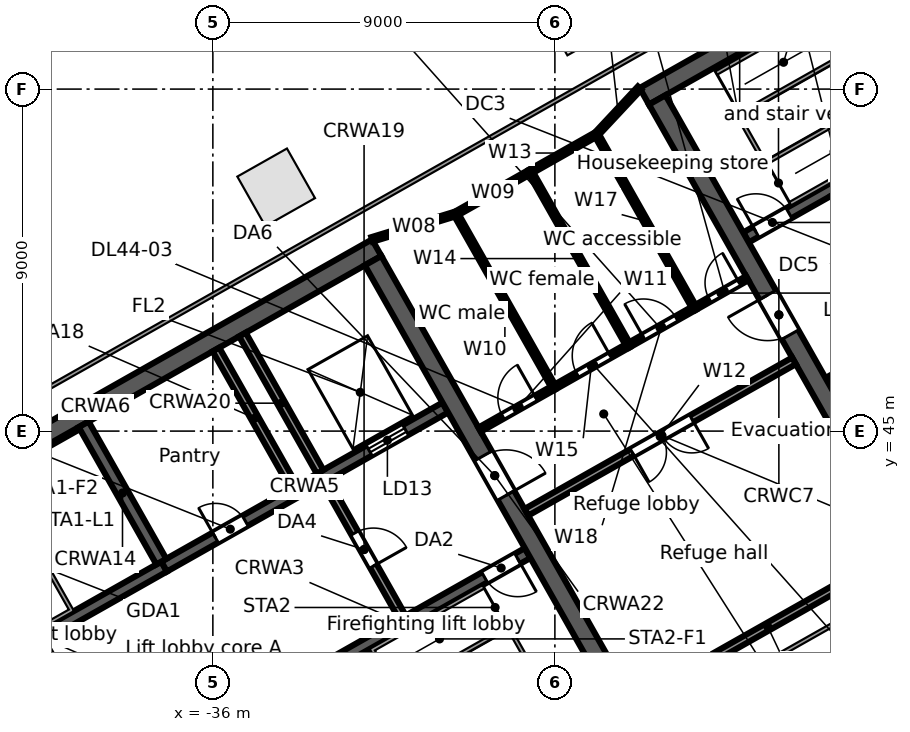
"""IFC4 building model, lengths in metres.
Left out: names, types, materials, properties, quantities, classifications, styles, units other than length and angle.
Written with IfcOpenShell. Run it as: python <this file> out.ifc"""

import sys

from ifc_helpers import new_model, si_unit, direction, frame, frame_2d, origin, origin_2d, place, context, subcontext, project, spatial, rectangle, extrude, element, fill, save


model = new_model("IFC4")
c1 = context("Model", 3, precision=1e-05, world=origin(), true_north=direction((0.0, 1.0)))
c2 = subcontext(c1, "Body", "Model", "MODEL_VIEW")
j1 = project(units=[si_unit("LENGTHUNIT", "METRE"), si_unit("PLANEANGLEUNIT", "RADIAN")], contexts=[c1])
p1 = place(None, origin())
s1 = spatial("IfcSite", under=j1, at=p1, CompositionType="ELEMENT")
p2 = place(p1, origin())
s2 = spatial("IfcBuilding", under=s1, at=p2, CompositionType="ELEMENT")
p3 = place(p2, frame((0.0, 0.0, 202.9)))
s3 = spatial("IfcBuildingStorey", under=s2, at=p3, CompositionType="ELEMENT", Elevation=202.9)
for number, where, z_axis, x_axis in (
    (1, (-26.388, 55.91, 0.0), (0.0, 0.0, 1.0), (-0.87, -0.492, 0.0)),
    (2, (-34.334, 51.414, 0.0), (0.0, 0.0, 1.0), (-0.87, -0.492, 0.0)),
):
    element("IfcColumn", number, at=place(p3, frame(where, z_axis=z_axis, x_axis=x_axis)), inside=s3, PredefinedType="COLUMN", context=c2, shape_type="SweptSolid", body=[
        extrude(rectangle(XDim=1.5, YDim=1.5, at=origin_2d()), origin(), (0.0, 0.0, 1.0), 4.6),
    ])
p4 = place(p3, frame((-34.245, 38.097, 0.0), z_axis=(0.0, 0.0, 1.0), x_axis=(0.870364520461, 0.492407962489, 0.0)))
e3 = element("IfcWall", 3, at=p4, inside=s3, PredefinedType="SOLIDWALL", context=c2, shape_type="SweptSolid", body=[
    extrude(rectangle(XDim=7.5, YDim=0.3, at=frame_2d((3.75, 0.0))), origin(), (0.0, 0.0, 1.0), 4.32),
])
p5 = place(p4, frame((6.2, 0.0, 0.0)))
e4 = element("IfcOpeningElement", 4, at=p5, cuts=e3, PredefinedType="OPENING", context=c2, shape_type="SweptSolid", body=[
    extrude(rectangle(XDim=1.0, YDim=2.1, at=frame_2d((0.5, 1.05))), frame((0.0, 0.16, 0.0), z_axis=(0.0, -1.0, 0.0), x_axis=(1.0, 0.0, 0.0)), (0.0, 0.0, 1.0), 0.32),
])
p6 = place(p3, frame((-43.81, 37.741, 0.0), z_axis=(0.0, 0.0, 1.0), x_axis=(0.870350569555, 0.492432620848, 0.0)))
e5 = element("IfcWall", 5, at=p6, inside=s3, PredefinedType="SOLIDWALL", context=c2, shape_type="SweptSolid", body=[
    extrude(rectangle(XDim=7.5, YDim=0.3, at=frame_2d((3.75, 0.0))), origin(), (0.0, 0.0, 1.0), 4.32),
])
p7 = place(p6, frame((0.3, 0.0, 0.0)))
e6 = element("IfcOpeningElement", 6, at=p7, cuts=e5, PredefinedType="OPENING", context=c2, shape_type="SweptSolid", body=[
    extrude(rectangle(XDim=1.0, YDim=2.1, at=frame_2d((0.5, 1.05))), frame((0.0, 0.16, 0.0), z_axis=(0.0, -1.0, 0.0), x_axis=(1.0, 0.0, 0.0)), (0.0, 0.0, 1.0), 0.32),
])
p8 = place(p3, frame((-37.282, 41.435, 0.0), z_axis=(0.0, 0.0, 1.0), x_axis=(0.870356271124, 0.492422543467, 0.0)))
e7 = element("IfcWall", 7, at=p8, inside=s3, PredefinedType="SOLIDWALL", context=c2, shape_type="SweptSolid", body=[
    extrude(rectangle(XDim=8.5, YDim=0.3, at=frame_2d((4.25, 0.0))), origin(), (0.0, 0.0, 1.0), 4.32),
])
p9 = place(p8, frame((6.2, 0.0, 0.0)))
e8 = element("IfcOpeningElement", 8, at=p9, cuts=e7, PredefinedType="OPENING", context=c2, shape_type="SweptSolid", body=[
    extrude(rectangle(XDim=1.1, YDim=2.1, at=frame_2d((0.55, 1.05))), frame((0.0, 0.16, 0.0), z_axis=(0.0, -1.0, 0.0), x_axis=(1.0, 0.0, 0.0)), (0.0, 0.0, 1.0), 0.32),
])
p10 = place(p8, frame((1.55, 0.0, 0.0)))
e9 = element("IfcOpeningElement", 9, at=p10, cuts=e7, PredefinedType="OPENING", context=c2, shape_type="SweptSolid", body=[
    extrude(rectangle(XDim=0.9, YDim=2.1, at=frame_2d((0.45, 1.05))), frame((0.0, 0.16, 0.0), z_axis=(0.0, -1.0, 0.0), x_axis=(1.0, 0.0, 0.0)), (0.0, 0.0, 1.0), 0.32),
])
p11 = place(p3, frame((-46.486, 41.455, 0.0), z_axis=(0.0, 0.0, 1.0), x_axis=(0.870353598469, 0.492427267353, 0.0)))
e10 = element("IfcWall", 10, at=p11, inside=s3, PredefinedType="SOLIDWALL", context=c2, shape_type="SweptSolid", body=[
    extrude(rectangle(XDim=17.0, YDim=0.5, at=frame_2d((8.5, 0.0))), origin(), (0.0, 0.0, 1.0), 4.32),
])
p12 = place(p3, frame((-46.145, 41.361, 0.0), z_axis=(0.0, 0.0, 1.0), x_axis=(0.492435316254, -0.870349044525, 0.0)))
e11 = element("IfcWall", 11, at=p12, inside=s3, PredefinedType="SOLIDWALL", context=c2, shape_type="SweptSolid", body=[
    extrude(rectangle(XDim=13.0, YDim=0.5, at=frame_2d((6.5, 0.0))), origin(), (0.0, 0.0, 1.0), 4.32),
])
p13 = place(p12, frame((5.9, 0.0, 0.0)))
e12 = element("IfcOpeningElement", 12, at=p13, cuts=e11, PredefinedType="OPENING", context=c2, shape_type="SweptSolid", body=[
    extrude(rectangle(XDim=1.2, YDim=2.1, at=frame_2d((0.6, 1.05))), frame((0.0, 0.26, 0.0), z_axis=(0.0, -1.0, 0.0), x_axis=(1.0, 0.0, 0.0)), (0.0, 0.0, 1.0), 0.52),
])
p14 = place(p3, frame((-40.516, 39.433, 0.0), z_axis=(0.0, 0.0, 1.0), x_axis=(0.492453559952, -0.87033872216, 0.0)))
e13 = element("IfcWall", 13, at=p14, inside=s3, PredefinedType="PARTITIONING", context=c2, shape_type="SweptSolid", body=[
    extrude(rectangle(XDim=4.1, YDim=0.2, at=frame_2d((2.05, 0.0))), origin(), (0.0, 0.0, 1.0), 4.32),
])
p15 = place(p14, frame((1.55, 0.0, 0.0)))
e14 = element("IfcOpeningElement", 14, at=p15, cuts=e13, PredefinedType="OPENING", context=c2, shape_type="SweptSolid", body=[
    extrude(rectangle(XDim=1.0, YDim=2.1, at=frame_2d((0.5, 1.05))), frame((0.0, 0.11, 0.0), z_axis=(0.0, -1.0, 0.0), x_axis=(1.0, 0.0, 0.0)), (0.0, 0.0, 1.0), 0.22),
])
p16 = place(p3, frame((-39.399, 45.177, 0.0), z_axis=(0.0, 0.0, 1.0), x_axis=(0.492396453737, -0.870371031427, 0.0)))
e15 = element("IfcWall", 15, at=p16, inside=s3, PredefinedType="SOLIDWALL", context=c2, shape_type="SweptSolid", body=[
    extrude(rectangle(XDim=4.15, YDim=0.3, at=frame_2d((2.075, 0.0))), origin(), (0.0, 0.0, 1.0), 4.32),
])
p17 = place(p3, frame((-35.918, 47.147, 0.0), z_axis=(0.0, 0.0, 1.0), x_axis=(0.492441017253, -0.870345818929, 0.0)))
e16 = element("IfcWall", 16, at=p17, inside=s3, PredefinedType="SOLIDWALL", context=c2, shape_type="SweptSolid", body=[
    extrude(rectangle(XDim=4.15, YDim=0.2, at=frame_2d((2.075, 0.0))), origin(), (0.0, 0.0, 1.0), 4.32),
])
p18 = place(p3, frame((-33.031, 43.667, 0.0), z_axis=(0.0, 0.0, 1.0), x_axis=(0.492408451753, -0.87036424366, 0.0)))
e17 = element("IfcWall", 17, at=p18, inside=s3, PredefinedType="PARTITIONING", context=c2, shape_type="SweptSolid", body=[
    extrude(rectangle(XDim=4.1, YDim=0.2, at=frame_2d((2.05, 0.0))), origin(), (0.0, 0.0, 1.0), 4.32),
])
p19 = place(p18, frame((1.55, 0.0, 0.0)))
e18 = element("IfcOpeningElement", 18, at=p19, cuts=e17, PredefinedType="OPENING", context=c2, shape_type="SweptSolid", body=[
    extrude(rectangle(XDim=1.0, YDim=2.1, at=frame_2d((0.5, 1.05))), frame((0.0, 0.11, 0.0), z_axis=(0.0, -1.0, 0.0), x_axis=(1.0, 0.0, 0.0)), (0.0, 0.0, 1.0), 0.22),
])
p20 = place(p3, frame((-35.222, 47.541, 0.0), z_axis=(0.0, 0.0, 1.0), x_axis=(0.492421666909, -0.870356767055, 0.0)))
e19 = element("IfcWall", 19, at=p20, inside=s3, PredefinedType="SOLIDWALL", context=c2, shape_type="SweptSolid", body=[
    extrude(rectangle(XDim=4.15, YDim=0.2, at=frame_2d((2.075, 0.0))), origin(), (0.0, 0.0, 1.0), 4.32),
])
p21 = place(p3, frame((-31.784, 49.486, 0.0), z_axis=(0.0, 0.0, 1.0), x_axis=(0.492435316254, -0.870349044525, 0.0)))
e20 = element("IfcWall", 20, at=p21, inside=s3, PredefinedType="SOLIDWALL", context=c2, shape_type="SweptSolid", body=[
    extrude(rectangle(XDim=13.0, YDim=0.5, at=frame_2d((6.5, 0.0))), origin(), (0.0, 0.0, 1.0), 4.32),
])
p22 = place(p21, frame((5.9, 0.0, 0.0)))
e21 = element("IfcOpeningElement", 21, at=p22, cuts=e20, PredefinedType="OPENING", context=c2, shape_type="SweptSolid", body=[
    extrude(rectangle(XDim=1.2, YDim=2.1, at=frame_2d((0.6, 1.05))), frame((0.0, 0.26, 0.0), z_axis=(0.0, -1.0, 0.0), x_axis=(1.0, 0.0, 0.0)), (0.0, 0.0, 1.0), 0.52),
])
p23 = place(p3, frame((-19.805, 46.267, 0.0), z_axis=(0.0, 0.0, 1.0), x_axis=(0.870353598469, 0.492427267353, 0.0)))
e22 = element("IfcWall", 22, at=p23, inside=s3, PredefinedType="SOLIDWALL", context=c2, shape_type="SweptSolid", body=[
    extrude(rectangle(XDim=5.0, YDim=0.3, at=frame_2d((2.5, 0.0))), origin(), (0.0, 0.0, 1.0), 4.32),
])
p24 = place(p23, frame((0.65, 0.0, 0.0)))
e23 = element("IfcOpeningElement", 23, at=p24, cuts=e22, PredefinedType="OPENING", context=c2, shape_type="SweptSolid", body=[
    extrude(rectangle(XDim=1.1, YDim=2.1, at=frame_2d((0.55, 1.05))), frame((0.0, 0.16, 0.0), z_axis=(0.0, -1.0, 0.0), x_axis=(1.0, 0.0, 0.0)), (0.0, 0.0, 1.0), 0.32),
])
p25 = place(p23, frame((3.75, 0.0, 0.0)))
e24 = element("IfcOpeningElement", 24, at=p25, cuts=e22, PredefinedType="OPENING", context=c2, shape_type="SweptSolid", body=[
    extrude(rectangle(XDim=0.9, YDim=2.1, at=frame_2d((0.45, 1.05))), frame((0.0, 0.16, 0.0), z_axis=(0.0, -1.0, 0.0), x_axis=(1.0, 0.0, 0.0)), (0.0, 0.0, 1.0), 0.32),
])
p26 = place(p3, frame((-21.972, 50.097, 0.0), z_axis=(0.0, 0.0, 1.0), x_axis=(0.870350976978, 0.492431900747, 0.0)))
e25 = element("IfcWall", 25, at=p26, inside=s3, PredefinedType="SOLIDWALL", context=c2, shape_type="SweptSolid", body=[
    extrude(rectangle(XDim=7.3, YDim=0.3, at=frame_2d((3.65, 0.0))), origin(), (0.0, 0.0, 1.0), 4.32),
])
p27 = place(p26, frame((0.3, 0.0, 0.0)))
e26 = element("IfcOpeningElement", 26, at=p27, cuts=e25, PredefinedType="OPENING", context=c2, shape_type="SweptSolid", body=[
    extrude(rectangle(XDim=1.0, YDim=2.1, at=frame_2d((0.5, 1.05))), frame((0.0, 0.16, 0.0), z_axis=(0.0, -1.0, 0.0), x_axis=(1.0, 0.0, 0.0)), (0.0, 0.0, 1.0), 0.32),
])
p28 = place(p3, frame((-24.647, 53.811, 0.0), z_axis=(0.0, 0.0, 1.0), x_axis=(0.87034965173, 0.492434243055, 0.0)))
e27 = element("IfcWall", 27, at=p28, inside=s3, PredefinedType="SOLIDWALL", context=c2, shape_type="SweptSolid", body=[
    extrude(rectangle(XDim=15.0, YDim=0.5, at=frame_2d((7.5, 0.0))), origin(), (0.0, 0.0, 1.0), 4.32),
])
p29 = place(p3, frame((-24.307, 53.716, 0.0), z_axis=(0.0, 0.0, 1.0), x_axis=(0.492427267353, -0.870353598469, 0.0)))
e28 = element("IfcWall", 28, at=p29, inside=s3, PredefinedType="SOLIDWALL", context=c2, shape_type="SweptSolid", body=[
    extrude(rectangle(XDim=13.0, YDim=0.5, at=frame_2d((6.5, 0.0))), origin(), (0.0, 0.0, 1.0), 4.32),
])
p30 = place(p29, frame((5.9, 0.0, 0.0)))
e29 = element("IfcOpeningElement", 29, at=p30, cuts=e28, PredefinedType="OPENING", context=c2, shape_type="SweptSolid", body=[
    extrude(rectangle(XDim=1.2, YDim=2.1, at=frame_2d((0.6, 1.05))), frame((0.0, 0.26, 0.0), z_axis=(0.0, -1.0, 0.0), x_axis=(1.0, 0.0, 0.0)), (0.0, 0.0, 1.0), 0.52),
])
p31 = place(p3, frame((-31.812, 50.044, 0.0), z_axis=(0.0, 0.0, 1.0), x_axis=(0.956397612161, 0.292067813107, 0.0)))
e30 = element("IfcWall", 30, at=p31, inside=s3, PredefinedType="PARTITIONING", context=c2, shape_type="SweptSolid", body=[
    extrude(rectangle(XDim=2.305, YDim=0.125, at=frame_2d((1.152, 0.0))), origin(), (0.0, 0.0, 1.0), 4.32),
])
p32 = place(p3, frame((-29.608, 50.717, 0.0), z_axis=(0.0, 0.0, 1.0), x_axis=(0.870332332106, 0.492464853254, 0.0)))
e31 = element("IfcWall", 31, at=p32, inside=s3, PredefinedType="PARTITIONING", context=c2, shape_type="SweptSolid", body=[
    extrude(rectangle(XDim=2.25, YDim=0.125, at=frame_2d((1.125, 0.0))), origin(), (0.0, 0.0, 1.0), 4.32),
])
p33 = place(p3, frame((-29.608, 50.717, 0.0), z_axis=(0.0, 0.0, 1.0), x_axis=(0.492328430905, -0.870409510588, 0.0)))
e32 = element("IfcWall", 32, at=p33, inside=s3, PredefinedType="PARTITIONING", context=c2, shape_type="SweptSolid", body=[
    extrude(rectangle(XDim=5.25, YDim=0.125, at=frame_2d((2.625, 0.0))), origin(), (0.0, 0.0, 1.0), 4.32),
])
p34 = place(p3, frame((-28.981, 45.039, 0.0), z_axis=(0.0, 0.0, 1.0), x_axis=(0.870332332106, 0.492464853254, 0.0)))
e33 = element("IfcWall", 33, at=p34, inside=s3, PredefinedType="PARTITIONING", context=c2, shape_type="SweptSolid", body=[
    extrude(rectangle(XDim=2.25, YDim=0.125, at=frame_2d((1.125, 0.0))), origin(), (0.0, 0.0, 1.0), 4.32),
])
p35 = place(p34, frame((0.7, 0.0, 0.0)))
e34 = element("IfcOpeningElement", 34, at=p35, cuts=e33, PredefinedType="OPENING", context=c2, shape_type="SweptSolid", body=[
    extrude(rectangle(XDim=1.0, YDim=2.1, at=frame_2d((0.5, 1.05))), frame((0.0, 0.073, 0.0), z_axis=(0.0, -1.0, 0.0), x_axis=(1.0, 0.0, 0.0)), (0.0, 0.0, 1.0), 0.145),
])
p36 = place(p3, frame((-27.75, 42.864, 0.0), z_axis=(0.0, 0.0, 1.0), x_axis=(0.870370568162, 0.492397272614, 0.0)))
e35 = element("IfcWall", 35, at=p36, inside=s3, PredefinedType="PARTITIONING", context=c2, shape_type="SweptSolid", body=[
    extrude(rectangle(XDim=8.091, YDim=0.2, at=frame_2d((4.045, 0.0))), origin(), (0.0, 0.0, 1.0), 3.592),
])
p37 = place(p36, frame((3.2, 0.0, 0.0)))
e36 = element("IfcOpeningElement", 36, at=p37, cuts=e35, PredefinedType="OPENING", context=c2, shape_type="SweptSolid", body=[
    extrude(rectangle(XDim=1.8, YDim=2.1, at=frame_2d((0.9, 1.05))), frame((0.0, 0.11, 0.0), z_axis=(0.0, -1.0, 0.0), x_axis=(1.0, 0.0, 0.0)), (0.0, 0.0, 1.0), 0.22),
])
p38 = place(p3, frame((-27.65, 51.825, 0.0), z_axis=(0.0, 0.0, 1.0), x_axis=(0.870330884088, 0.492467412326, 0.0)))
e37 = element("IfcWall", 37, at=p38, inside=s3, PredefinedType="PARTITIONING", context=c2, shape_type="SweptSolid", body=[
    extrude(rectangle(XDim=2.0, YDim=0.125, at=frame_2d((1.0, 0.0))), origin(), (0.0, 0.0, 1.0), 4.32),
])
p39 = place(p3, frame((-27.65, 51.825, 0.0), z_axis=(0.0, 0.0, 1.0), x_axis=(0.492469323632, -0.870329802593, 0.0)))
e38 = element("IfcWall", 38, at=p39, inside=s3, PredefinedType="PARTITIONING", context=c2, shape_type="SweptSolid", body=[
    extrude(rectangle(XDim=5.251, YDim=0.125, at=frame_2d((2.625, 0.0))), origin(), (0.0, 0.0, 1.0), 4.32),
])
p40 = place(p3, frame((-27.023, 46.147, 0.0), z_axis=(0.0, 0.0, 1.0), x_axis=(0.870437546499, 0.492278861667, 0.0)))
e39 = element("IfcWall", 39, at=p40, inside=s3, PredefinedType="PARTITIONING", context=c2, shape_type="SweptSolid", body=[
    extrude(rectangle(XDim=2.25, YDim=0.125, at=frame_2d((1.125, 0.0))), origin(), (0.0, 0.0, 1.0), 4.32),
])
p41 = place(p40, frame((0.7, 0.0, 0.0)))
e40 = element("IfcOpeningElement", 40, at=p41, cuts=e39, PredefinedType="OPENING", context=c2, shape_type="SweptSolid", body=[
    extrude(rectangle(XDim=1.0, YDim=2.1, at=frame_2d((0.5, 1.05))), frame((0.0, 0.073, 0.0), z_axis=(0.0, -1.0, 0.0), x_axis=(1.0, 0.0, 0.0)), (0.0, 0.0, 1.0), 0.145),
])
p42 = place(p3, frame((-25.909, 52.81, 0.0), z_axis=(0.0, 0.0, 1.0), x_axis=(0.682678244456, 0.730719107829, 0.0)))
e41 = element("IfcWall", 41, at=p42, inside=s3, PredefinedType="PARTITIONING", context=c2, shape_type="SweptSolid", body=[
    extrude(rectangle(XDim=1.667, YDim=0.125, at=frame_2d((0.833, 0.0))), origin(), (0.0, 0.0, 1.0), 3.592),
])
p43 = place(p3, frame((-25.909, 52.81, 0.0), z_axis=(0.0, 0.0, 1.0), x_axis=(0.492328430905, -0.870409510588, 0.0)))
e42 = element("IfcWall", 42, at=p43, inside=s3, PredefinedType="PARTITIONING", context=c2, shape_type="SweptSolid", body=[
    extrude(rectangle(XDim=5.25, YDim=0.125, at=frame_2d((2.625, 0.0))), origin(), (0.0, 0.0, 1.0), 4.32),
])
p44 = place(p3, frame((-25.064, 47.255, 0.0), z_axis=(0.0, 0.0, 1.0), x_axis=(0.87021240934, 0.492676732382, 0.0)))
e43 = element("IfcWall", 43, at=p44, inside=s3, PredefinedType="PARTITIONING", context=c2, shape_type="SweptSolid", body=[
    extrude(rectangle(XDim=2.0, YDim=0.125, at=frame_2d((1.0, 0.0))), origin(), (0.0, 0.0, 1.0), 4.32),
])
p45 = place(p44, frame((0.45, 0.0, 0.0)))
e44 = element("IfcOpeningElement", 44, at=p45, cuts=e43, PredefinedType="OPENING", context=c2, shape_type="SweptSolid", body=[
    extrude(rectangle(XDim=1.0, YDim=2.1, at=frame_2d((0.5, 1.05))), frame((0.0, 0.073, 0.0), z_axis=(0.0, -1.0, 0.0), x_axis=(1.0, 0.0, 0.0)), (0.0, 0.0, 1.0), 0.145),
])
p46 = place(p3, frame((-24.919, 37.859, 0.0), z_axis=(0.0, 0.0, 1.0), x_axis=(0.870357635969, 0.492420131098, 0.0)))
e45 = element("IfcWall", 45, at=p46, inside=s3, PredefinedType="PARTITIONING", context=c2, shape_type="SweptSolid", body=[
    extrude(rectangle(XDim=8.091, YDim=0.2, at=frame_2d((4.045, 0.0))), origin(), (0.0, 0.0, 1.0), 3.592),
])
p47 = place(p3, frame((-23.324, 48.24, 0.0), z_axis=(0.0, 0.0, 1.0), x_axis=(0.870265540569, 0.492582875157, 0.0)))
e46 = element("IfcWall", 46, at=p47, inside=s3, PredefinedType="PARTITIONING", context=c2, shape_type="SweptSolid", body=[
    extrude(rectangle(XDim=1.592, YDim=0.125, at=frame_2d((0.796, 0.0))), origin(), (0.0, 0.0, 1.0), 3.592),
])
p48 = place(p47, frame((0.45, 0.0, 0.0)))
e47 = element("IfcOpeningElement", 47, at=p48, cuts=e46, PredefinedType="OPENING", context=c2, shape_type="SweptSolid", body=[
    extrude(rectangle(XDim=0.9, YDim=2.1, at=frame_2d((0.45, 1.05))), frame((0.0, 0.073, 0.0), z_axis=(0.0, -1.0, 0.0), x_axis=(1.0, 0.0, 0.0)), (0.0, 0.0, 1.0), 0.145),
])
p49 = place(p9, origin())
e48 = element("IfcDoor", 48, at=p49, inside=s3, OperationType="DOUBLE_DOOR_SLIDING", PredefinedType="DOOR", context=c2, shape_type="SweptSolid", body=[
    extrude(rectangle(XDim=1.1, YDim=2.1, at=frame_2d((0.55, 1.05))), frame((0.0, 0.025, 0.0), z_axis=(0.0, -1.0, 0.0), x_axis=(1.0, 0.0, 0.0)), (0.0, 0.0, 1.0), 0.05),
])
fill(e8, e48)
p50 = place(p5, frame((1.0, 0.0, 0.0), z_axis=(0.0, 0.0, 1.0), x_axis=(-1.0, 0.0, 0.0)))
e49 = element("IfcDoor", 49, at=p50, inside=s3, OperationType="SINGLE_SWING_LEFT", PredefinedType="DOOR", context=c2, shape_type="SweptSolid", body=[
    extrude(rectangle(XDim=1.0, YDim=2.1, at=frame_2d((0.5, 1.05))), frame((0.0, 0.025, 0.0), z_axis=(0.0, -1.0, 0.0), x_axis=(1.0, 0.0, 0.0)), (0.0, 0.0, 1.0), 0.05),
])
fill(e4, e49)
p51 = place(p19, origin())
e50 = element("IfcDoor", 50, at=p51, inside=s3, OperationType="SINGLE_SWING_RIGHT", PredefinedType="DOOR", context=c2, shape_type="SweptSolid", body=[
    extrude(rectangle(XDim=1.0, YDim=2.1, at=frame_2d((0.5, 1.05))), frame((0.0, 0.025, 0.0), z_axis=(0.0, -1.0, 0.0), x_axis=(1.0, 0.0, 0.0)), (0.0, 0.0, 1.0), 0.05),
])
fill(e18, e50)
p52 = place(p22, origin())
e51 = element("IfcDoor", 51, at=p52, inside=s3, OperationType="SINGLE_SWING_RIGHT", PredefinedType="DOOR", context=c2, shape_type="SweptSolid", body=[
    extrude(rectangle(XDim=1.2, YDim=2.1, at=frame_2d((0.6, 1.05))), frame((0.0, 0.025, 0.0), z_axis=(0.0, -1.0, 0.0), x_axis=(1.0, 0.0, 0.0)), (0.0, 0.0, 1.0), 0.05),
])
fill(e21, e51)
p53 = place(p10, origin())
e52 = element("IfcDoor", 52, at=p53, inside=s3, OperationType="SINGLE_SWING_LEFT", PredefinedType="DOOR", context=c2, shape_type="SweptSolid", body=[
    extrude(rectangle(XDim=0.9, YDim=2.1, at=frame_2d((0.45, 1.05))), frame((0.0, 0.025, 0.0), z_axis=(0.0, -1.0, 0.0), x_axis=(1.0, 0.0, 0.0)), (0.0, 0.0, 1.0), 0.05),
])
fill(e9, e52)
p54 = place(p27, origin())
e53 = element("IfcDoor", 53, at=p54, inside=s3, OperationType="SINGLE_SWING_LEFT", PredefinedType="DOOR", context=c2, shape_type="SweptSolid", body=[
    extrude(rectangle(XDim=1.0, YDim=2.1, at=frame_2d((0.5, 1.05))), frame((0.0, 0.025, 0.0), z_axis=(0.0, -1.0, 0.0), x_axis=(1.0, 0.0, 0.0)), (0.0, 0.0, 1.0), 0.05),
])
fill(e26, e53)
p55 = place(p30, frame((1.2, 0.0, 0.0), z_axis=(0.0, 0.0, 1.0), x_axis=(-1.0, 0.0, 0.0)))
e54 = element("IfcDoor", 54, at=p55, inside=s3, OperationType="SINGLE_SWING_RIGHT", PredefinedType="DOOR", context=c2, shape_type="SweptSolid", body=[
    extrude(rectangle(XDim=1.2, YDim=2.1, at=frame_2d((0.6, 1.05))), frame((0.0, 0.025, 0.0), z_axis=(0.0, -1.0, 0.0), x_axis=(1.0, 0.0, 0.0)), (0.0, 0.0, 1.0), 0.05),
])
fill(e29, e54)
p56 = place(p35, origin())
e55 = element("IfcDoor", 55, at=p56, inside=s3, OperationType="SINGLE_SWING_RIGHT", PredefinedType="DOOR", context=c2, shape_type="SweptSolid", body=[
    extrude(rectangle(XDim=1.0, YDim=2.1, at=frame_2d((0.5, 1.05))), frame((0.0, 0.025, 0.0), z_axis=(0.0, -1.0, 0.0), x_axis=(1.0, 0.0, 0.0)), (0.0, 0.0, 1.0), 0.05),
])
fill(e34, e55)
p57 = place(p41, origin())
e56 = element("IfcDoor", 56, at=p57, inside=s3, OperationType="SINGLE_SWING_RIGHT", PredefinedType="DOOR", context=c2, shape_type="SweptSolid", body=[
    extrude(rectangle(XDim=1.0, YDim=2.1, at=frame_2d((0.5, 1.05))), frame((0.0, 0.025, 0.0), z_axis=(0.0, -1.0, 0.0), x_axis=(1.0, 0.0, 0.0)), (0.0, 0.0, 1.0), 0.05),
])
fill(e40, e56)
p58 = place(p45, origin())
e57 = element("IfcDoor", 57, at=p58, inside=s3, OperationType="SINGLE_SWING_LEFT", PredefinedType="DOOR", context=c2, shape_type="SweptSolid", body=[
    extrude(rectangle(XDim=1.0, YDim=2.1, at=frame_2d((0.5, 1.05))), frame((0.0, 0.025, 0.0), z_axis=(0.0, -1.0, 0.0), x_axis=(1.0, 0.0, 0.0)), (0.0, 0.0, 1.0), 0.05),
])
fill(e44, e57)
p59 = place(p48, origin())
e58 = element("IfcDoor", 58, at=p59, inside=s3, OperationType="SINGLE_SWING_RIGHT", PredefinedType="DOOR", context=c2, shape_type="SweptSolid", body=[
    extrude(rectangle(XDim=0.9, YDim=2.1, at=frame_2d((0.45, 1.05))), frame((0.0, 0.025, 0.0), z_axis=(0.0, -1.0, 0.0), x_axis=(1.0, 0.0, 0.0)), (0.0, 0.0, 1.0), 0.05),
])
fill(e47, e58)
p60 = place(p37, frame((1.8, 0.0, 0.0), z_axis=(0.0, 0.0, 1.0), x_axis=(-1.0, 0.0, 0.0)))
e59 = element("IfcDoor", 59, at=p60, inside=s3, OperationType="DOUBLE_DOOR_SINGLE_SWING", PredefinedType="DOOR", context=c2, shape_type="SweptSolid", body=[
    extrude(rectangle(XDim=1.8, YDim=2.1, at=frame_2d((0.9, 1.05))), frame((0.0, 0.025, 0.0), z_axis=(0.0, -1.0, 0.0), x_axis=(1.0, 0.0, 0.0)), (0.0, 0.0, 1.0), 0.05),
])
fill(e36, e59)
save(model, sys.argv[1])
